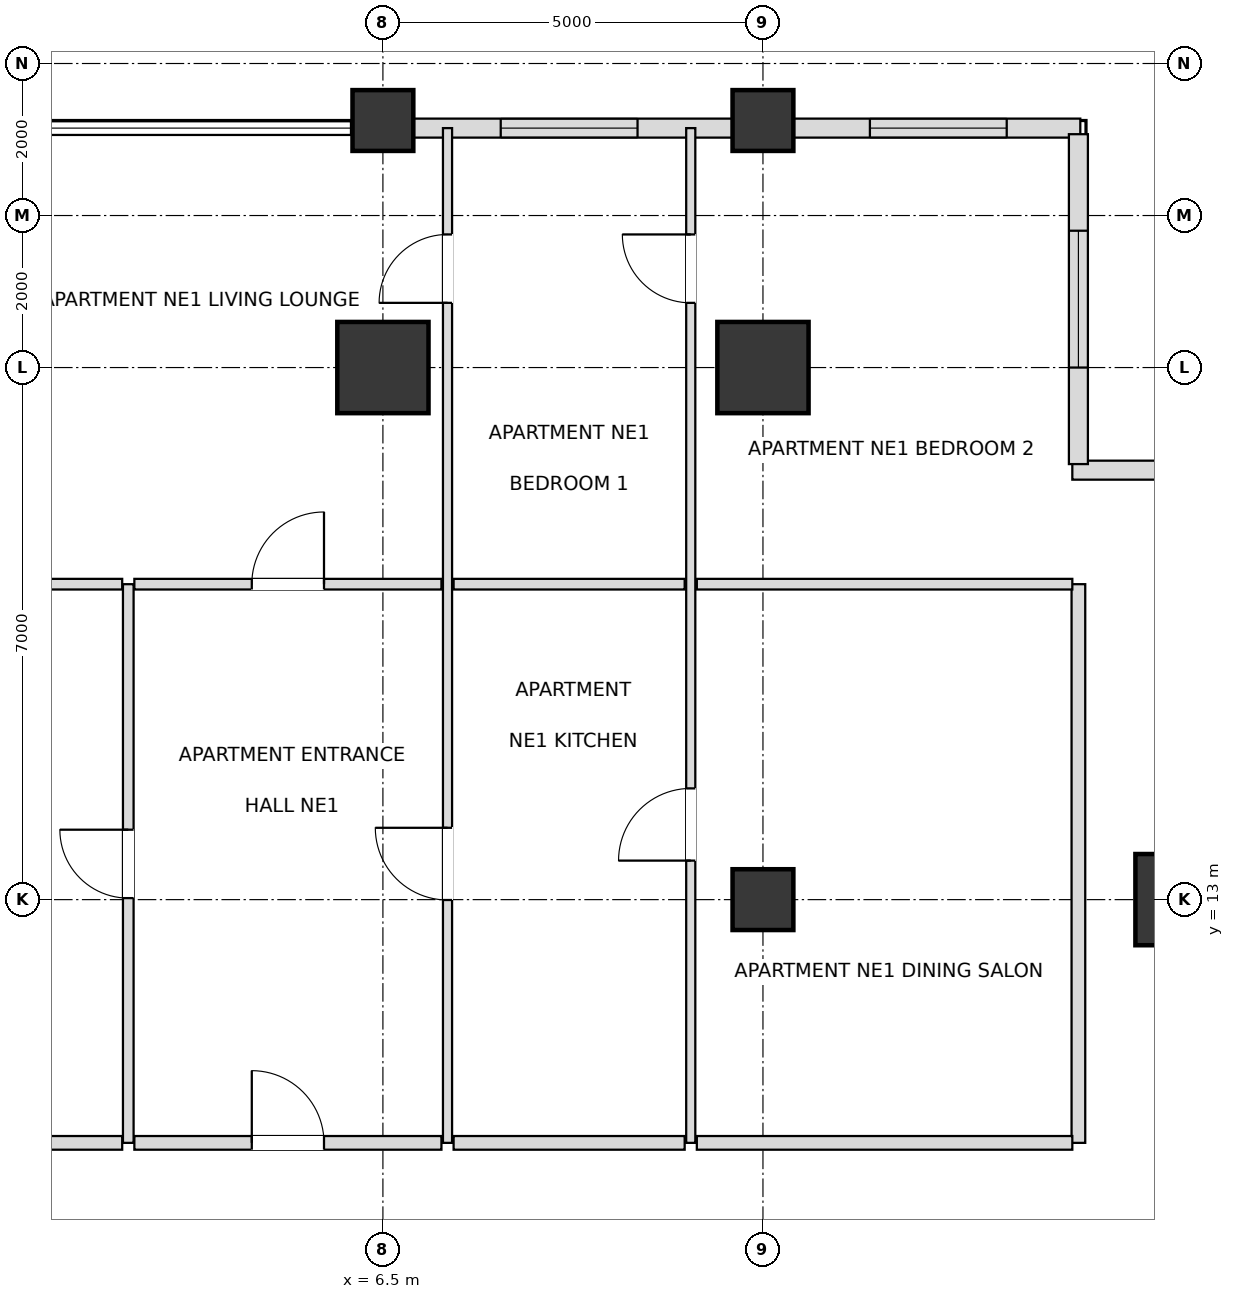
"""IFC4 building model, lengths in metres.
Left out: names, types, materials, properties, quantities, classifications, styles, units other than length and angle.
Written with IfcOpenShell. Run it as: python <this file> out.ifc"""

import sys

from ifc_helpers import new_model, si_unit, direction, frame, frame_2d, origin, origin_2d, place, context, subcontext, project, spatial, rectangle, extrude, element, fill, save


model = new_model("IFC4")
c1 = context("Model", 3, precision=1e-05, world=origin(), true_north=direction((0.0, 1.0)))
c2 = subcontext(c1, "Body", "Model", "MODEL_VIEW")
j1 = project(units=[si_unit("LENGTHUNIT", "METRE"), si_unit("PLANEANGLEUNIT", "RADIAN")], contexts=[c1])
p1 = place(None, origin())
s1 = spatial("IfcSite", under=j1, at=p1, CompositionType="ELEMENT")
p2 = place(p1, origin())
s2 = spatial("IfcBuilding", under=s1, at=p2, CompositionType="ELEMENT")
p3 = place(p2, frame((0.0, 0.0, 140.4)))
s3 = spatial("IfcBuildingStorey", under=s2, at=p3, CompositionType="ELEMENT", Elevation=140.4)
for number, where, z_axis, x_axis in (
    (1, (17.0, 13.0, 0.0), (0.0, 0.0, 1.0), (1.0, 0.0, 0.0)),
    (2, (11.5, 20.0, 0.0), (0.0, 0.0, 1.0), (1.0, 0.0, 0.0)),
    (3, (6.5, 20.0, 0.0), (0.0, 0.0, 1.0), (1.0, 0.0, 0.0)),
):
    element("IfcColumn", number, at=place(p3, frame(where, z_axis=z_axis, x_axis=x_axis)), inside=s3, PredefinedType="USERDEFINED", context=c2, shape_type="SweptSolid", body=[
        extrude(rectangle(XDim=1.2, YDim=1.2, at=origin_2d()), origin(), (0.0, 0.0, 1.0), 3.6),
    ])
for number, where, z_axis, x_axis in (
    (4, (11.5, 13.0, 0.0), (0.0, 0.0, 1.0), (1.0, 0.0, 0.0)),
    (5, (6.5, 23.25, 0.0), (0.0, 0.0, 1.0), (1.0, 0.0, 0.0)),
    (6, (11.5, 23.25, 0.0), (0.0, 0.0, 1.0), (1.0, 0.0, 0.0)),
):
    element("IfcColumn", number, at=place(p3, frame(where, z_axis=z_axis, x_axis=x_axis)), inside=s3, PredefinedType="COLUMN", context=c2, shape_type="SweptSolid", body=[
        extrude(rectangle(XDim=0.8, YDim=0.8, at=origin_2d()), origin(), (0.0, 0.0, 1.0), 3.6),
    ])
p4 = place(p3, frame((15.675, 23.15, 0.0), z_axis=(0.0, 0.0, 1.0), x_axis=(-1.0, 0.0, 0.0)))
e7 = element("IfcWall", 7, at=p4, inside=s3, PredefinedType="SOLIDWALL", context=c2, shape_type="SweptSolid", body=[
    extrude(rectangle(XDim=3.78, YDim=0.25, at=frame_2d((1.89, 0.0))), origin(), (0.0, 0.0, 1.0), 2.736),
])
p5 = place(p4, frame((0.968, 0.0, 0.72)))
e8 = element("IfcOpeningElement", 8, at=p5, cuts=e7, PredefinedType="OPENING", context=c2, shape_type="SweptSolid", body=[
    extrude(rectangle(XDim=1.8, YDim=1.68, at=frame_2d((0.9, 0.84))), frame((0.0, 0.135, 0.0), z_axis=(0.0, -1.0, 0.0), x_axis=(1.0, 0.0, 0.0)), (0.0, 0.0, 1.0), 0.27),
])
p6 = place(p3, frame((11.105, 23.15, 0.0), z_axis=(0.0, 0.0, 1.0), x_axis=(-1.0, 0.0, 0.0)))
e9 = element("IfcWall", 9, at=p6, inside=s3, PredefinedType="SOLIDWALL", context=c2, shape_type="SweptSolid", body=[
    extrude(rectangle(XDim=4.21, YDim=0.25, at=frame_2d((2.105, 0.0))), origin(), (0.0, 0.0, 1.0), 2.736),
])
p7 = place(p6, frame((1.255, 0.0, 0.72)))
e10 = element("IfcOpeningElement", 10, at=p7, cuts=e9, PredefinedType="OPENING", context=c2, shape_type="SweptSolid", body=[
    extrude(rectangle(XDim=1.8, YDim=1.68, at=frame_2d((0.9, 0.84))), frame((0.0, 0.135, 0.0), z_axis=(0.0, -1.0, 0.0), x_axis=(1.0, 0.0, 0.0)), (0.0, 0.0, 1.0), 0.27),
])
p8 = place(p3, frame((20.23, 18.65, 0.0), z_axis=(0.0, 0.0, 1.0), x_axis=(-1.0, 0.0, 0.0)))
e11 = element("IfcWall", 11, at=p8, inside=s3, PredefinedType="SOLIDWALL", context=c2, shape_type="SweptSolid", body=[
    extrude(rectangle(XDim=4.66, YDim=0.25, at=frame_2d((2.33, 0.0))), origin(), (0.0, 0.0, 1.0), 2.736),
])
p9 = place(p8, frame((1.43, 0.0, 0.72)))
e12 = element("IfcOpeningElement", 12, at=p9, cuts=e11, PredefinedType="OPENING", context=c2, shape_type="SweptSolid", body=[
    extrude(rectangle(XDim=1.8, YDim=1.68, at=frame_2d((0.9, 0.84))), frame((0.0, 0.135, 0.0), z_axis=(0.0, -1.0, 0.0), x_axis=(1.0, 0.0, 0.0)), (0.0, 0.0, 1.0), 0.27),
])
p10 = place(p3, frame((15.65, 18.73, 0.0), z_axis=(0.0, 0.0, 1.0), x_axis=(0.0, 1.0, 0.0)))
e13 = element("IfcWall", 13, at=p10, inside=s3, PredefinedType="SOLIDWALL", context=c2, shape_type="SweptSolid", body=[
    extrude(rectangle(XDim=4.34, YDim=0.25, at=frame_2d((2.17, 0.0))), origin(), (0.0, 0.0, 1.0), 2.736),
])
p11 = place(p10, frame((1.27, 0.0, 0.72)))
e14 = element("IfcOpeningElement", 14, at=p11, cuts=e13, PredefinedType="OPENING", context=c2, shape_type="SweptSolid", body=[
    extrude(rectangle(XDim=1.8, YDim=1.68, at=frame_2d((0.9, 0.84))), frame((0.0, 0.135, 0.0), z_axis=(0.0, -1.0, 0.0), x_axis=(1.0, 0.0, 0.0)), (0.0, 0.0, 1.0), 0.27),
])
p12 = place(p3, frame((3.15, 9.8, 0.0), z_axis=(0.0, 0.0, 1.0), x_axis=(0.0, 1.0, 0.0)))
e15 = element("IfcWall", 15, at=p12, inside=s3, PredefinedType="PARTITIONING", context=c2, shape_type="SweptSolid", body=[
    extrude(rectangle(XDim=7.35, YDim=0.14, at=frame_2d((3.675, 0.0))), origin(), (0.0, 0.0, 1.0), 3.38),
])
p13 = place(p12, frame((3.22, 0.0, 0.0)))
e16 = element("IfcOpeningElement", 16, at=p13, cuts=e15, PredefinedType="OPENING", context=c2, shape_type="SweptSolid", body=[
    extrude(rectangle(XDim=0.9, YDim=2.1, at=frame_2d((0.45, 1.05))), frame((0.0, 0.08, 0.0), z_axis=(0.0, -1.0, 0.0), x_axis=(1.0, 0.0, 0.0)), (0.0, 0.0, 1.0), 0.16),
])
p14 = place(p3, frame((7.35, 9.8, 0.0), z_axis=(0.0, 0.0, 1.0), x_axis=(0.0, 1.0, 0.0)))
e17 = element("IfcWall", 17, at=p14, inside=s3, PredefinedType="PARTITIONING", context=c2, shape_type="SweptSolid", body=[
    extrude(rectangle(XDim=13.35, YDim=0.12, at=frame_2d((6.675, 0.0))), origin(), (0.0, 0.0, 1.0), 2.816),
])
p15 = place(p14, frame((3.195, 0.0, 0.0)))
e18 = element("IfcOpeningElement", 18, at=p15, cuts=e17, PredefinedType="OPENING", context=c2, shape_type="SweptSolid", body=[
    extrude(rectangle(XDim=0.95, YDim=2.1, at=frame_2d((0.475, 1.05))), frame((0.0, 0.07, 0.0), z_axis=(0.0, -1.0, 0.0), x_axis=(1.0, 0.0, 0.0)), (0.0, 0.0, 1.0), 0.14),
])
p16 = place(p14, frame((11.051, 0.0, 0.0)))
e19 = element("IfcOpeningElement", 19, at=p16, cuts=e17, PredefinedType="OPENING", context=c2, shape_type="SweptSolid", body=[
    extrude(rectangle(XDim=0.9, YDim=2.1, at=frame_2d((0.45, 1.05))), frame((0.0, 0.07, 0.0), z_axis=(0.0, -1.0, 0.0), x_axis=(1.0, 0.0, 0.0)), (0.0, 0.0, 1.0), 0.14),
])
p17 = place(p3, frame((10.55, 9.8, 0.0), z_axis=(0.0, 0.0, 1.0), x_axis=(0.0, 1.0, 0.0)))
e20 = element("IfcWall", 20, at=p17, inside=s3, PredefinedType="PARTITIONING", context=c2, shape_type="SweptSolid", body=[
    extrude(rectangle(XDim=13.35, YDim=0.12, at=frame_2d((6.675, 0.0))), origin(), (0.0, 0.0, 1.0), 2.816),
])
p18 = place(p17, frame((3.713, 0.0, 0.0)))
e21 = element("IfcOpeningElement", 21, at=p18, cuts=e20, PredefinedType="OPENING", context=c2, shape_type="SweptSolid", body=[
    extrude(rectangle(XDim=0.95, YDim=2.1, at=frame_2d((0.475, 1.05))), frame((0.0, 0.07, 0.0), z_axis=(0.0, -1.0, 0.0), x_axis=(1.0, 0.0, 0.0)), (0.0, 0.0, 1.0), 0.14),
])
p19 = place(p17, frame((11.051, 0.0, 0.0)))
e22 = element("IfcOpeningElement", 22, at=p19, cuts=e20, PredefinedType="OPENING", context=c2, shape_type="SweptSolid", body=[
    extrude(rectangle(XDim=0.9, YDim=2.1, at=frame_2d((0.45, 1.05))), frame((0.0, 0.07, 0.0), z_axis=(0.0, -1.0, 0.0), x_axis=(1.0, 0.0, 0.0)), (0.0, 0.0, 1.0), 0.14),
])
p20 = place(p3, frame((15.65, 9.8, 0.0), z_axis=(0.0, 0.0, 1.0), x_axis=(0.0, 1.0, 0.0)))
e23 = element("IfcWall", 23, at=p20, inside=s3, PredefinedType="PARTITIONING", context=c2, shape_type="SweptSolid", body=[
    extrude(rectangle(XDim=7.35, YDim=0.18, at=frame_2d((3.675, 0.0))), origin(), (0.0, 0.0, 1.0), 2.736),
])
p21 = place(p3, frame((1.28, 9.8, 0.0), z_axis=(0.0, 0.0, 1.0), x_axis=(1.0, 0.0, 0.0)))
e24 = element("IfcWall", 24, at=p21, inside=s3, PredefinedType="PARTITIONING", context=c2, shape_type="SweptSolid", body=[
    extrude(rectangle(XDim=1.79, YDim=0.18, at=frame_2d((0.895, 0.0))), origin(), (0.0, 0.0, 1.0), 3.38),
])
p22 = place(p3, frame((3.23, 9.8, 0.0), z_axis=(0.0, 0.0, 1.0), x_axis=(1.0, 0.0, 0.0)))
e25 = element("IfcWall", 25, at=p22, inside=s3, PredefinedType="PARTITIONING", context=c2, shape_type="SweptSolid", body=[
    extrude(rectangle(XDim=4.04, YDim=0.18, at=frame_2d((2.02, 0.0))), origin(), (0.0, 0.0, 1.0), 2.816),
])
p23 = place(p22, frame((1.545, 0.0, 0.0)))
e26 = element("IfcOpeningElement", 26, at=p23, cuts=e25, PredefinedType="OPENING", context=c2, shape_type="SweptSolid", body=[
    extrude(rectangle(XDim=0.95, YDim=2.15, at=frame_2d((0.475, 1.075))), frame((0.0, 0.1, 0.0), z_axis=(0.0, -1.0, 0.0), x_axis=(1.0, 0.0, 0.0)), (0.0, 0.0, 1.0), 0.2),
])
p24 = place(p3, frame((7.43, 9.8, 0.0), z_axis=(0.0, 0.0, 1.0), x_axis=(1.0, 0.0, 0.0)))
e27 = element("IfcWall", 27, at=p24, inside=s3, PredefinedType="PARTITIONING", context=c2, shape_type="SweptSolid", body=[
    extrude(rectangle(XDim=3.04, YDim=0.18, at=frame_2d((1.52, 0.0))), origin(), (0.0, 0.0, 1.0), 3.38),
])
p25 = place(p3, frame((10.63, 9.8, 0.0), z_axis=(0.0, 0.0, 1.0), x_axis=(1.0, 0.0, 0.0)))
e28 = element("IfcWall", 28, at=p25, inside=s3, PredefinedType="PARTITIONING", context=c2, shape_type="SweptSolid", body=[
    extrude(rectangle(XDim=4.94, YDim=0.18, at=frame_2d((2.47, 0.0))), origin(), (0.0, 0.0, 1.0), 3.38),
])
p26 = place(p3, frame((1.28, 17.15, 0.0), z_axis=(0.0, 0.0, 1.0), x_axis=(1.0, 0.0, 0.0)))
e29 = element("IfcWall", 29, at=p26, inside=s3, PredefinedType="PARTITIONING", context=c2, shape_type="SweptSolid", body=[
    extrude(rectangle(XDim=1.79, YDim=0.14, at=frame_2d((0.895, 0.0))), origin(), (0.0, 0.0, 1.0), 3.38),
])
p27 = place(p3, frame((3.23, 17.15, 0.0), z_axis=(0.0, 0.0, 1.0), x_axis=(1.0, 0.0, 0.0)))
e30 = element("IfcWall", 30, at=p27, inside=s3, PredefinedType="PARTITIONING", context=c2, shape_type="SweptSolid", body=[
    extrude(rectangle(XDim=4.04, YDim=0.14, at=frame_2d((2.02, 0.0))), origin(), (0.0, 0.0, 1.0), 2.816),
])
p28 = place(p27, frame((1.545, 0.0, 0.0)))
e31 = element("IfcOpeningElement", 31, at=p28, cuts=e30, PredefinedType="OPENING", context=c2, shape_type="SweptSolid", body=[
    extrude(rectangle(XDim=0.95, YDim=2.1, at=frame_2d((0.475, 1.05))), frame((0.0, 0.08, 0.0), z_axis=(0.0, -1.0, 0.0), x_axis=(1.0, 0.0, 0.0)), (0.0, 0.0, 1.0), 0.16),
])
p29 = place(p3, frame((7.43, 17.15, 0.0), z_axis=(0.0, 0.0, 1.0), x_axis=(1.0, 0.0, 0.0)))
e32 = element("IfcWall", 32, at=p29, inside=s3, PredefinedType="PARTITIONING", context=c2, shape_type="SweptSolid", body=[
    extrude(rectangle(XDim=3.04, YDim=0.14, at=frame_2d((1.52, 0.0))), origin(), (0.0, 0.0, 1.0), 3.38),
])
p30 = place(p3, frame((10.63, 17.15, 0.0), z_axis=(0.0, 0.0, 1.0), x_axis=(1.0, 0.0, 0.0)))
e33 = element("IfcWall", 33, at=p30, inside=s3, PredefinedType="PARTITIONING", context=c2, shape_type="SweptSolid", body=[
    extrude(rectangle(XDim=4.94, YDim=0.14, at=frame_2d((2.47, 0.0))), origin(), (0.0, 0.0, 1.0), 2.736),
])
p31 = place(p5, origin())
e34 = element("IfcWindow", 34, at=p31, inside=s3, PartitioningType="SINGLE_PANEL", PredefinedType="WINDOW", context=c2, shape_type="SweptSolid", body=[
    extrude(rectangle(XDim=1.8, YDim=1.68, at=frame_2d((0.9, 0.84))), frame((0.0, 0.03, 0.0), z_axis=(0.0, -1.0, 0.0), x_axis=(1.0, 0.0, 0.0)), (0.0, 0.0, 1.0), 0.06),
])
fill(e8, e34)
p32 = place(p7, origin())
e35 = element("IfcWindow", 35, at=p32, inside=s3, PartitioningType="SINGLE_PANEL", PredefinedType="WINDOW", context=c2, shape_type="SweptSolid", body=[
    extrude(rectangle(XDim=1.8, YDim=1.68, at=frame_2d((0.9, 0.84))), frame((0.0, 0.03, 0.0), z_axis=(0.0, -1.0, 0.0), x_axis=(1.0, 0.0, 0.0)), (0.0, 0.0, 1.0), 0.06),
])
fill(e10, e35)
p33 = place(p11, origin())
e36 = element("IfcWindow", 36, at=p33, inside=s3, PartitioningType="SINGLE_PANEL", PredefinedType="WINDOW", context=c2, shape_type="SweptSolid", body=[
    extrude(rectangle(XDim=1.8, YDim=1.68, at=frame_2d((0.9, 0.84))), frame((0.0, 0.03, 0.0), z_axis=(0.0, -1.0, 0.0), x_axis=(1.0, 0.0, 0.0)), (0.0, 0.0, 1.0), 0.06),
])
fill(e14, e36)
p34 = place(p13, origin())
e37 = element("IfcDoor", 37, at=p34, inside=s3, OperationType="SINGLE_SWING_RIGHT", PredefinedType="DOOR", context=c2, shape_type="SweptSolid", body=[
    extrude(rectangle(XDim=0.9, YDim=2.1, at=frame_2d((0.45, 1.05))), frame((0.0, 0.025, 0.0), z_axis=(0.0, -1.0, 0.0), x_axis=(1.0, 0.0, 0.0)), (0.0, 0.0, 1.0), 0.05),
])
fill(e16, e37)
p35 = place(p23, origin())
e38 = element("IfcDoor", 38, at=p35, inside=s3, OperationType="SINGLE_SWING_LEFT", PredefinedType="DOOR", context=c2, shape_type="SweptSolid", body=[
    extrude(rectangle(XDim=0.95, YDim=2.15, at=frame_2d((0.475, 1.075))), frame((0.0, 0.025, 0.0), z_axis=(0.0, -1.0, 0.0), x_axis=(1.0, 0.0, 0.0)), (0.0, 0.0, 1.0), 0.05),
])
fill(e26, e38)
p36 = place(p15, origin())
e39 = element("IfcDoor", 39, at=p36, inside=s3, OperationType="SINGLE_SWING_RIGHT", PredefinedType="DOOR", context=c2, shape_type="SweptSolid", body=[
    extrude(rectangle(XDim=0.95, YDim=2.1, at=frame_2d((0.475, 1.05))), frame((0.0, 0.025, 0.0), z_axis=(0.0, -1.0, 0.0), x_axis=(1.0, 0.0, 0.0)), (0.0, 0.0, 1.0), 0.05),
])
fill(e18, e39)
p37 = place(p18, origin())
e40 = element("IfcDoor", 40, at=p37, inside=s3, OperationType="SINGLE_SWING_LEFT", PredefinedType="DOOR", context=c2, shape_type="SweptSolid", body=[
    extrude(rectangle(XDim=0.95, YDim=2.1, at=frame_2d((0.475, 1.05))), frame((0.0, 0.025, 0.0), z_axis=(0.0, -1.0, 0.0), x_axis=(1.0, 0.0, 0.0)), (0.0, 0.0, 1.0), 0.05),
])
fill(e21, e40)
p38 = place(p28, origin())
e41 = element("IfcDoor", 41, at=p38, inside=s3, OperationType="SINGLE_SWING_RIGHT", PredefinedType="DOOR", context=c2, shape_type="SweptSolid", body=[
    extrude(rectangle(XDim=0.95, YDim=2.1, at=frame_2d((0.475, 1.05))), frame((0.0, 0.025, 0.0), z_axis=(0.0, -1.0, 0.0), x_axis=(1.0, 0.0, 0.0)), (0.0, 0.0, 1.0), 0.05),
])
fill(e31, e41)
p39 = place(p16, origin())
e42 = element("IfcDoor", 42, at=p39, inside=s3, OperationType="SINGLE_SWING_LEFT", PredefinedType="DOOR", context=c2, shape_type="SweptSolid", body=[
    extrude(rectangle(XDim=0.9, YDim=2.1, at=frame_2d((0.45, 1.05))), frame((0.0, 0.025, 0.0), z_axis=(0.0, -1.0, 0.0), x_axis=(1.0, 0.0, 0.0)), (0.0, 0.0, 1.0), 0.05),
])
fill(e19, e42)
p40 = place(p19, origin())
e43 = element("IfcDoor", 43, at=p40, inside=s3, OperationType="SINGLE_SWING_RIGHT", PredefinedType="DOOR", context=c2, shape_type="SweptSolid", body=[
    extrude(rectangle(XDim=0.9, YDim=2.1, at=frame_2d((0.45, 1.05))), frame((0.0, 0.025, 0.0), z_axis=(0.0, -1.0, 0.0), x_axis=(1.0, 0.0, 0.0)), (0.0, 0.0, 1.0), 0.05),
])
fill(e22, e43)
save(model, sys.argv[1])
